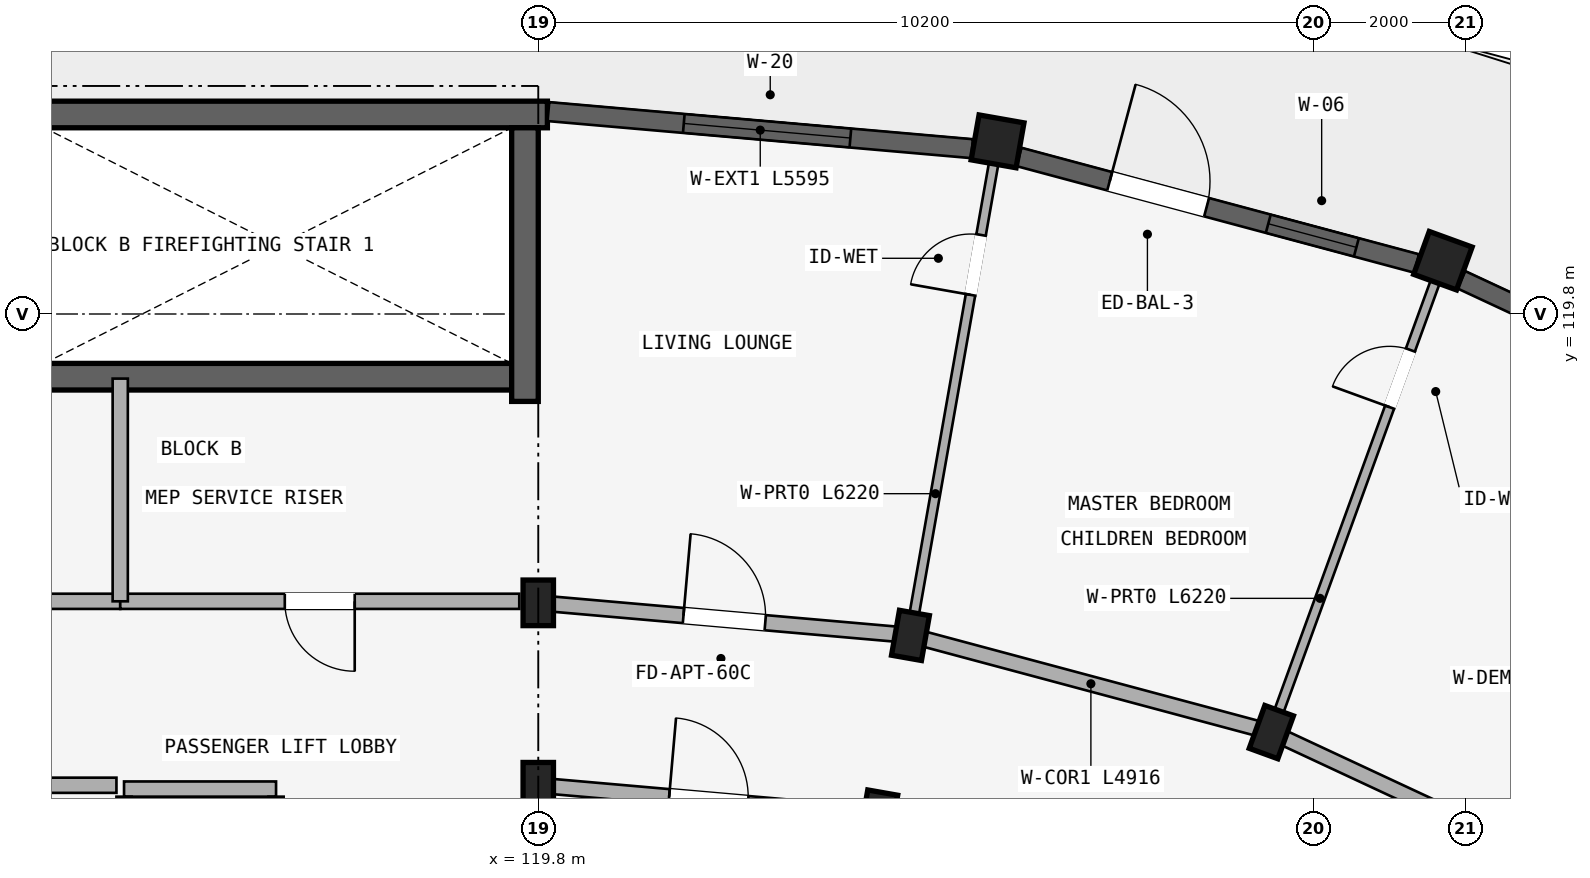
"""IFC4 building model, lengths in metres.
Left out: names, types, materials, properties, quantities, classifications, styles, units other than length and angle.
Written with IfcOpenShell. Run it as: python <this file> out.ifc"""

import sys

from ifc_helpers import new_model, si_unit, direction, frame, frame_2d, origin, origin_2d, place, context, subcontext, project, spatial, rectangle, extrude, element, fill, save


model = new_model("IFC4")
c1 = context("Model", 3, precision=1e-05, world=origin(), true_north=direction((0.0, 1.0)))
c2 = subcontext(c1, "Body", "Model", "MODEL_VIEW")
j1 = project(units=[si_unit("LENGTHUNIT", "METRE"), si_unit("PLANEANGLEUNIT", "RADIAN")], contexts=[c1])
p1 = place(None, origin())
s1 = spatial("IfcSite", under=j1, at=p1, CompositionType="ELEMENT")
p2 = place(p1, origin())
s2 = spatial("IfcBuilding", under=s1, at=p2, CompositionType="ELEMENT")
p3 = place(p2, frame((0.0, 0.0, 40.2)))
s3 = spatial("IfcBuildingStorey", under=s2, at=p3, CompositionType="ELEMENT", Elevation=40.2)
p4 = place(p3, frame((119.92, 122.425, 0.0), z_axis=(0.0, 0.0, 1.0), x_axis=(-1.0, 0.0, 0.0)))
e1 = element("IfcWall", 1, at=p4, inside=s3, PredefinedType="SHEAR", context=c2, shape_type="SweptSolid", body=[
    extrude(rectangle(XDim=8.545, YDim=0.35, at=frame_2d((4.272, 0.0))), origin(), (0.0, 0.0, 1.0), 2.91),
])
p5 = place(p3, frame((119.45, 118.975, 0.0), z_axis=(0.0, 0.0, 1.0), x_axis=(-1.0, 0.0, 0.0)))
e2 = element("IfcWall", 2, at=p5, inside=s3, PredefinedType="SHEAR", context=c2, shape_type="SweptSolid", body=[
    extrude(rectangle(XDim=8.075, YDim=0.35, at=frame_2d((4.038, 0.0))), origin(), (0.0, 0.0, 1.0), 2.91),
])
p6 = place(p5, frame((6.38, 0.0, 0.0)))
e3 = element("IfcOpeningElement", 3, at=p6, cuts=e2, PredefinedType="OPENING", context=c2, shape_type="SweptSolid", body=[
    extrude(rectangle(XDim=1.24, YDim=2.15, at=frame_2d((0.62, 1.075))), frame((0.0, 0.185, 0.0), z_axis=(0.0, -1.0, 0.0), x_axis=(1.0, 0.0, 0.0)), (0.0, 0.0, 1.0), 0.37),
])
p7 = place(p3, frame((119.625, 118.65, 0.0), z_axis=(0.0, 0.0, 1.0), x_axis=(0.0, 1.0, 0.0)))
e4 = element("IfcWall", 4, at=p7, inside=s3, PredefinedType="SHEAR", context=c2, shape_type="SweptSolid", body=[
    extrude(rectangle(XDim=3.6, YDim=0.35, at=frame_2d((1.8, 0.0))), origin(), (0.0, 0.0, 1.0), 2.91),
])
for number, where, z_axis, x_axis in (
    (5, (119.8, 113.6, 0.0), (0.0, 0.0, 1.0), (1.0, 0.0, 0.0)),
    (6, (119.8, 116.0, 0.0), (0.0, 0.0, 1.0), (1.0, 0.0, 0.0)),
    (7, (124.28, 113.208, 0.0), (0.0, 0.0, 1.0), (-0.985, 0.174, 0.0)),
    (8, (124.697, 115.572, 0.0), (0.0, 0.0, 1.0), (-0.985, 0.174, 0.0)),
):
    element("IfcColumn", number, at=place(p3, frame(where, z_axis=z_axis, x_axis=x_axis)), inside=s3, PredefinedType="COLUMN", context=c2, shape_type="SweptSolid", body=[
        extrude(rectangle(XDim=0.4, YDim=0.6, at=origin_2d()), origin(), (0.0, 0.0, 1.0), 2.91),
    ])
p8 = place(p3, frame((125.843, 122.071, 0.0), z_axis=(0.0, 0.0, 1.0), x_axis=(-0.984807753012, 0.173648177667, 0.0)))
e9 = element("IfcColumn", 9, at=p8, inside=s3, PredefinedType="COLUMN", context=c2, shape_type="SweptSolid", body=[
    extrude(rectangle(XDim=0.6, YDim=0.6, at=origin_2d()), origin(), (0.0, 0.0, 1.0), 2.91),
])
p9 = place(p3, frame((129.445, 114.299, 0.0), z_axis=(0.0, 0.0, 1.0), x_axis=(-0.939692620786, 0.342020143326, 0.0)))
e10 = element("IfcColumn", 10, at=p9, inside=s3, PredefinedType="COLUMN", context=c2, shape_type="SweptSolid", body=[
    extrude(rectangle(XDim=0.4, YDim=0.6, at=origin_2d()), origin(), (0.0, 0.0, 1.0), 2.91),
])
p10 = place(p3, frame((131.702, 120.501, 0.0), z_axis=(0.0, 0.0, 1.0), x_axis=(-0.939692620786, 0.342020143326, 0.0)))
e11 = element("IfcColumn", 11, at=p10, inside=s3, PredefinedType="COLUMN", context=c2, shape_type="SweptSolid", body=[
    extrude(rectangle(XDim=0.6, YDim=0.6, at=origin_2d()), origin(), (0.0, 0.0, 1.0), 2.91),
])
p11 = place(p3, frame((114.3, 116.02, 0.0), z_axis=(0.0, 0.0, 1.0), x_axis=(-1.0, 0.0, 0.0)))
e12 = element("IfcWall", 12, at=p11, inside=s3, PredefinedType="STANDARD", context=c2, shape_type="SweptSolid", body=[
    extrude(rectangle(XDim=5.65, YDim=0.2, at=frame_2d((2.825, 0.0))), origin(), (0.0, 0.0, 1.0), 2.352),
])
p12 = place(p11, frame((1.923, 0.0, 0.0)))
e13 = element("IfcOpeningElement", 13, at=p12, cuts=e12, PredefinedType="OPENING", context=c2, shape_type="SweptSolid", body=[
    extrude(rectangle(XDim=1.24, YDim=2.15, at=frame_2d((0.62, 1.075))), frame((0.0, 0.11, 0.0), z_axis=(0.0, -1.0, 0.0), x_axis=(1.0, 0.0, 0.0)), (0.0, 0.0, 1.0), 0.22),
])
p13 = place(p3, frame((119.55, 116.02, 0.0), z_axis=(0.0, 0.0, 1.0), x_axis=(-1.0, 0.0, 0.0)))
e14 = element("IfcWall", 14, at=p13, inside=s3, PredefinedType="STANDARD", context=c2, shape_type="SweptSolid", body=[
    extrude(rectangle(XDim=5.25, YDim=0.2, at=frame_2d((2.625, 0.0))), origin(), (0.0, 0.0, 1.0), 2.352),
])
p14 = place(p13, frame((2.165, 0.0, 0.0)))
e15 = element("IfcOpeningElement", 15, at=p14, cuts=e14, PredefinedType="OPENING", context=c2, shape_type="SweptSolid", body=[
    extrude(rectangle(XDim=0.92, YDim=2.1, at=frame_2d((0.46, 1.05))), frame((0.0, 0.11, 0.0), z_axis=(0.0, -1.0, 0.0), x_axis=(1.0, 0.0, 0.0)), (0.0, 0.0, 1.0), 0.22),
])
p15 = place(p3, frame((114.3, 116.02, 0.0), z_axis=(0.0, 0.0, 1.0), x_axis=(0.0, 1.0, 0.0)))
e16 = element("IfcWall", 16, at=p15, inside=s3, PredefinedType="STANDARD", context=c2, shape_type="SweptSolid", body=[
    extrude(rectangle(XDim=2.93, YDim=0.2, at=frame_2d((1.465, 0.0))), origin(), (0.0, 0.0, 1.0), 2.352),
])
p16 = place(p3, frame((116.35, 113.55, 0.0), z_axis=(0.0, 0.0, 1.0), x_axis=(-1.0, 0.0, 0.0)))
e17 = element("IfcWall", 17, at=p16, inside=s3, PredefinedType="STANDARD", context=c2, shape_type="SweptSolid", body=[
    extrude(rectangle(XDim=2.0, YDim=0.2, at=frame_2d((1.0, 0.0))), origin(), (0.0, 0.0, 1.0), 2.352),
])
p17 = place(p3, frame((116.35, 110.85, 0.0), z_axis=(0.0, 0.0, 1.0), x_axis=(0.0, 1.0, 0.0)))
e18 = element("IfcWall", 18, at=p17, inside=s3, PredefinedType="STANDARD", context=c2, shape_type="SweptSolid", body=[
    extrude(rectangle(XDim=2.6, YDim=0.2, at=frame_2d((1.3, 0.0))), origin(), (0.0, 0.0, 1.0), 2.352),
])
p18 = place(p3, frame((114.35, 110.85, 0.0), z_axis=(0.0, 0.0, 1.0), x_axis=(0.0, 1.0, 0.0)))
e19 = element("IfcWall", 19, at=p18, inside=s3, PredefinedType="STANDARD", context=c2, shape_type="SweptSolid", body=[
    extrude(rectangle(XDim=2.6, YDim=0.2, at=frame_2d((1.3, 0.0))), origin(), (0.0, 0.0, 1.0), 2.352),
])
p19 = place(p18, frame((0.79, 0.0, 0.0)))
e20 = element("IfcOpeningElement", 20, at=p19, cuts=e19, PredefinedType="OPENING", context=c2, shape_type="SweptSolid", body=[
    extrude(rectangle(XDim=1.02, YDim=2.15, at=frame_2d((0.51, 1.075))), frame((0.0, 0.11, 0.0), z_axis=(0.0, -1.0, 0.0), x_axis=(1.0, 0.0, 0.0)), (0.0, 0.0, 1.0), 0.22),
])
p20 = place(p3, frame((114.25, 113.6, 0.0), z_axis=(0.0, 0.0, 1.0), x_axis=(-1.0, 0.0, 0.0)))
e21 = element("IfcWall", 21, at=p20, inside=s3, PredefinedType="STANDARD", context=c2, shape_type="SweptSolid", body=[
    extrude(rectangle(XDim=5.6, YDim=0.2, at=frame_2d((2.8, 0.0))), origin(), (0.0, 0.0, 1.0), 2.352),
])
p21 = place(p20, frame((1.91, 0.0, 0.0)))
e22 = element("IfcOpeningElement", 22, at=p21, cuts=e21, PredefinedType="OPENING", context=c2, shape_type="SweptSolid", body=[
    extrude(rectangle(XDim=1.22, YDim=2.15, at=frame_2d((0.61, 1.075))), frame((0.0, 0.11, 0.0), z_axis=(0.0, -1.0, 0.0), x_axis=(1.0, 0.0, 0.0)), (0.0, 0.0, 1.0), 0.22),
])
p22 = place(p3, frame((119.8, 113.6, 0.0), z_axis=(0.0, 0.0, 1.0), x_axis=(0.996191949488, -0.087187153726, 0.0)))
e23 = element("IfcWall", 23, at=p22, inside=s3, PredefinedType="STANDARD", context=c2, shape_type="SweptSolid", body=[
    extrude(rectangle(XDim=4.497, YDim=0.2, at=frame_2d((2.249, 0.0))), origin(), (0.0, 0.0, 1.0), 2.352),
])
p23 = place(p22, frame((1.729, 0.0, 0.0)))
e24 = element("IfcOpeningElement", 24, at=p23, cuts=e23, PredefinedType="OPENING", context=c2, shape_type="SweptSolid", body=[
    extrude(rectangle(XDim=1.04, YDim=2.15, at=frame_2d((0.52, 1.075))), frame((0.0, 0.11, 0.0), z_axis=(0.0, -1.0, 0.0), x_axis=(1.0, 0.0, 0.0)), (0.0, 0.0, 1.0), 0.22),
])
p24 = place(p3, frame((119.8, 116.0, 0.0), z_axis=(0.0, 0.0, 1.0), x_axis=(0.996193663584, -0.087167566415, 0.0)))
e25 = element("IfcWall", 25, at=p24, inside=s3, PredefinedType="STANDARD", context=c2, shape_type="SweptSolid", body=[
    extrude(rectangle(XDim=4.916, YDim=0.2, at=frame_2d((2.458, 0.0))), origin(), (0.0, 0.0, 1.0), 2.352),
])
p25 = place(p24, frame((1.918, 0.0, 0.0)))
e26 = element("IfcOpeningElement", 26, at=p25, cuts=e25, PredefinedType="OPENING", context=c2, shape_type="SweptSolid", body=[
    extrude(rectangle(XDim=1.08, YDim=2.15, at=frame_2d((0.54, 1.075))), frame((0.0, 0.11, 0.0), z_axis=(0.0, -1.0, 0.0), x_axis=(1.0, 0.0, 0.0)), (0.0, 0.0, 1.0), 0.22),
])
p26 = place(p3, frame((124.697, 115.572, 0.0), z_axis=(0.0, 0.0, 1.0), x_axis=(0.965930095386, -0.258803112091, 0.0)))
e27 = element("IfcWall", 27, at=p26, inside=s3, PredefinedType="STANDARD", context=c2, shape_type="SweptSolid", body=[
    extrude(rectangle(XDim=4.916, YDim=0.2, at=frame_2d((2.458, 0.0))), origin(), (0.0, 0.0, 1.0), 2.352),
])
p27 = place(p3, frame((129.445, 114.299, 0.0), z_axis=(0.0, 0.0, 1.0), x_axis=(0.906302381024, -0.422629854778, 0.0)))
e28 = element("IfcWall", 28, at=p27, inside=s3, PredefinedType="STANDARD", context=c2, shape_type="SweptSolid", body=[
    extrude(rectangle(XDim=4.915, YDim=0.2, at=frame_2d((2.458, 0.0))), origin(), (0.0, 0.0, 1.0), 2.352),
])
p28 = place(p3, frame((119.8, 110.35, 0.0), z_axis=(0.0, 0.0, 1.0), x_axis=(0.0, 1.0, 0.0)))
e29 = element("IfcWall", 29, at=p28, inside=s3, PredefinedType="STANDARD", context=c2, shape_type="SweptSolid", body=[
    extrude(rectangle(XDim=3.2, YDim=0.22, at=frame_2d((1.6, 0.0))), origin(), (0.0, 0.0, 1.0), 2.352),
])
p29 = place(p3, frame((124.714, 115.67, 0.0), z_axis=(0.0, 0.0, 1.0), x_axis=(0.173646504755, 0.98480804799, 0.0)))
e30 = element("IfcWall", 30, at=p29, inside=s3, PredefinedType="PARTITIONING", context=c2, shape_type="SweptSolid", body=[
    extrude(rectangle(XDim=6.22, YDim=0.125, at=frame_2d((3.11, 0.0))), origin(), (0.0, 0.0, 1.0), 2.352),
])
p30 = place(p29, frame((4.45, 0.0, 0.0)))
e31 = element("IfcOpeningElement", 31, at=p30, cuts=e30, PredefinedType="OPENING", context=c2, shape_type="SweptSolid", body=[
    extrude(rectangle(XDim=0.8, YDim=2.1, at=frame_2d((0.4, 1.05))), frame((0.0, 0.073, 0.0), z_axis=(0.0, -1.0, 0.0), x_axis=(1.0, 0.0, 0.0)), (0.0, 0.0, 1.0), 0.145),
])
p31 = place(p3, frame((129.479, 114.393, 0.0), z_axis=(0.0, 0.0, 1.0), x_axis=(0.341992021352, 0.939702855871, 0.0)))
e32 = element("IfcWall", 32, at=p31, inside=s3, PredefinedType="PARTITIONING", context=c2, shape_type="SweptSolid", body=[
    extrude(rectangle(XDim=6.22, YDim=0.125, at=frame_2d((3.11, 0.0))), origin(), (0.0, 0.0, 1.0), 2.352),
])
p32 = place(p31, frame((4.45, 0.0, 0.0)))
e33 = element("IfcOpeningElement", 33, at=p32, cuts=e32, PredefinedType="OPENING", context=c2, shape_type="SweptSolid", body=[
    extrude(rectangle(XDim=0.8, YDim=2.1, at=frame_2d((0.4, 1.05))), frame((0.0, 0.073, 0.0), z_axis=(0.0, -1.0, 0.0), x_axis=(1.0, 0.0, 0.0)), (0.0, 0.0, 1.0), 0.145),
])
p33 = place(p3, frame((119.934, 122.463, 0.0), z_axis=(0.0, 0.0, 1.0), x_axis=(0.996192628107, -0.087179399543, 0.0)))
e34 = element("IfcWall", 34, at=p33, inside=s3, PredefinedType="STANDARD", context=c2, shape_type="SweptSolid", body=[
    extrude(rectangle(XDim=5.595, YDim=0.25, at=frame_2d((2.798, 0.0))), origin(), (0.0, 0.0, 1.0), 2.452),
])
p34 = place(p33, frame((1.788, 0.0, 0.352)))
e35 = element("IfcOpeningElement", 35, at=p34, cuts=e34, PredefinedType="OPENING", context=c2, shape_type="SweptSolid", body=[
    extrude(rectangle(XDim=2.2, YDim=1.9, at=frame_2d((1.1, 0.95))), frame((0.0, 0.135, 0.0), z_axis=(0.0, -1.0, 0.0), x_axis=(1.0, 0.0, 0.0)), (0.0, 0.0, 1.0), 0.27),
])
p35 = place(p3, frame((126.125, 121.866, 0.0), z_axis=(0.0, 0.0, 1.0), x_axis=(0.965928932241, -0.258807453254, 0.0)))
e36 = element("IfcWall", 36, at=p35, inside=s3, PredefinedType="STANDARD", context=c2, shape_type="SweptSolid", body=[
    extrude(rectangle(XDim=5.415, YDim=0.25, at=frame_2d((2.708, 0.0))), origin(), (0.0, 0.0, 1.0), 2.452),
])
p36 = place(p35, frame((3.395, 0.0, 0.502)))
e37 = element("IfcOpeningElement", 37, at=p36, cuts=e36, PredefinedType="OPENING", context=c2, shape_type="SweptSolid", body=[
    extrude(rectangle(XDim=1.2, YDim=1.5, at=frame_2d((0.6, 0.75))), frame((0.0, 0.135, 0.0), z_axis=(0.0, -1.0, 0.0), x_axis=(1.0, 0.0, 0.0)), (0.0, 0.0, 1.0), 0.27),
])
p37 = place(p35, frame((1.235, 0.0, 0.0)))
e38 = element("IfcOpeningElement", 38, at=p37, cuts=e36, PredefinedType="OPENING", context=c2, shape_type="SweptSolid", body=[
    extrude(rectangle(XDim=1.32, YDim=2.15, at=frame_2d((0.66, 1.075))), frame((0.0, 0.135, 0.0), z_axis=(0.0, -1.0, 0.0), x_axis=(1.0, 0.0, 0.0)), (0.0, 0.0, 1.0), 0.27),
])
p38 = place(p3, frame((131.945, 120.25, 0.0), z_axis=(0.0, 0.0, 1.0), x_axis=(0.90629483869, -0.42264602845, 0.0)))
e39 = element("IfcWall", 39, at=p38, inside=s3, PredefinedType="STANDARD", context=c2, shape_type="SweptSolid", body=[
    extrude(rectangle(XDim=5.415, YDim=0.25, at=frame_2d((2.708, 0.0))), origin(), (0.0, 0.0, 1.0), 2.452),
])
p39 = place(p38, frame((1.807, 0.0, 0.602)))
e40 = element("IfcOpeningElement", 40, at=p39, cuts=e39, PredefinedType="OPENING", context=c2, shape_type="SweptSolid", body=[
    extrude(rectangle(XDim=1.8, YDim=1.65, at=frame_2d((0.9, 0.825))), frame((0.0, 0.135, 0.0), z_axis=(0.0, -1.0, 0.0), x_axis=(1.0, 0.0, 0.0)), (0.0, 0.0, 1.0), 0.27),
])
p40 = place(p34, origin())
e41 = element("IfcWindow", 41, at=p40, inside=s3, PartitioningType="TRIPLE_PANEL_VERTICAL", PredefinedType="WINDOW", context=c2, shape_type="SweptSolid", body=[
    extrude(rectangle(XDim=2.2, YDim=1.9, at=frame_2d((1.1, 0.95))), frame((0.0, 0.03, 0.0), z_axis=(0.0, -1.0, 0.0), x_axis=(1.0, 0.0, 0.0)), (0.0, 0.0, 1.0), 0.06),
])
fill(e35, e41)
p41 = place(p36, origin())
e42 = element("IfcWindow", 42, at=p41, inside=s3, PartitioningType="SINGLE_PANEL", PredefinedType="WINDOW", context=c2, shape_type="SweptSolid", body=[
    extrude(rectangle(XDim=1.2, YDim=1.5, at=frame_2d((0.6, 0.75))), frame((0.0, 0.03, 0.0), z_axis=(0.0, -1.0, 0.0), x_axis=(1.0, 0.0, 0.0)), (0.0, 0.0, 1.0), 0.06),
])
fill(e37, e42)
p42 = place(p14, frame((0.92, 0.0, 0.0), z_axis=(0.0, 0.0, 1.0), x_axis=(-1.0, 0.0, 0.0)))
e43 = element("IfcDoor", 43, at=p42, inside=s3, OperationType="SINGLE_SWING_RIGHT", PredefinedType="DOOR", context=c2, shape_type="SweptSolid", body=[
    extrude(rectangle(XDim=0.92, YDim=2.1, at=frame_2d((0.46, 1.05))), frame((0.0, 0.025, 0.0), z_axis=(0.0, -1.0, 0.0), x_axis=(1.0, 0.0, 0.0)), (0.0, 0.0, 1.0), 0.05),
])
fill(e15, e43)
p43 = place(p30, frame((0.8, 0.0, 0.0), z_axis=(0.0, 0.0, 1.0), x_axis=(-1.0, 0.0, 0.0)))
e44 = element("IfcDoor", 44, at=p43, inside=s3, OperationType="SINGLE_SWING_RIGHT", PredefinedType="DOOR", context=c2, shape_type="SweptSolid", body=[
    extrude(rectangle(XDim=0.8, YDim=2.1, at=frame_2d((0.4, 1.05))), frame((0.0, 0.025, 0.0), z_axis=(0.0, -1.0, 0.0), x_axis=(1.0, 0.0, 0.0)), (0.0, 0.0, 1.0), 0.05),
])
fill(e31, e44)
p44 = place(p32, origin())
e45 = element("IfcDoor", 45, at=p44, inside=s3, OperationType="SINGLE_SWING_LEFT", PredefinedType="DOOR", context=c2, shape_type="SweptSolid", body=[
    extrude(rectangle(XDim=0.8, YDim=2.1, at=frame_2d((0.4, 1.05))), frame((0.0, 0.025, 0.0), z_axis=(0.0, -1.0, 0.0), x_axis=(1.0, 0.0, 0.0)), (0.0, 0.0, 1.0), 0.05),
])
fill(e33, e45)
p45 = place(p25, origin())
e46 = element("IfcDoor", 46, at=p45, inside=s3, OperationType="SINGLE_SWING_LEFT", PredefinedType="DOOR", context=c2, shape_type="SweptSolid", body=[
    extrude(rectangle(XDim=1.08, YDim=2.15, at=frame_2d((0.54, 1.075))), frame((0.0, 0.025, 0.0), z_axis=(0.0, -1.0, 0.0), x_axis=(1.0, 0.0, 0.0)), (0.0, 0.0, 1.0), 0.05),
])
fill(e26, e46)
p46 = place(p23, origin())
e47 = element("IfcDoor", 47, at=p46, inside=s3, OperationType="SINGLE_SWING_LEFT", PredefinedType="DOOR", context=c2, shape_type="SweptSolid", body=[
    extrude(rectangle(XDim=1.04, YDim=2.15, at=frame_2d((0.52, 1.075))), frame((0.0, 0.025, 0.0), z_axis=(0.0, -1.0, 0.0), x_axis=(1.0, 0.0, 0.0)), (0.0, 0.0, 1.0), 0.05),
])
fill(e24, e47)
p47 = place(p37, origin())
e48 = element("IfcDoor", 48, at=p47, inside=s3, OperationType="SINGLE_SWING_LEFT", PredefinedType="DOOR", context=c2, shape_type="SweptSolid", body=[
    extrude(rectangle(XDim=1.32, YDim=2.15, at=frame_2d((0.66, 1.075))), frame((0.0, 0.025, 0.0), z_axis=(0.0, -1.0, 0.0), x_axis=(1.0, 0.0, 0.0)), (0.0, 0.0, 1.0), 0.05),
])
fill(e38, e48)
save(model, sys.argv[1])
